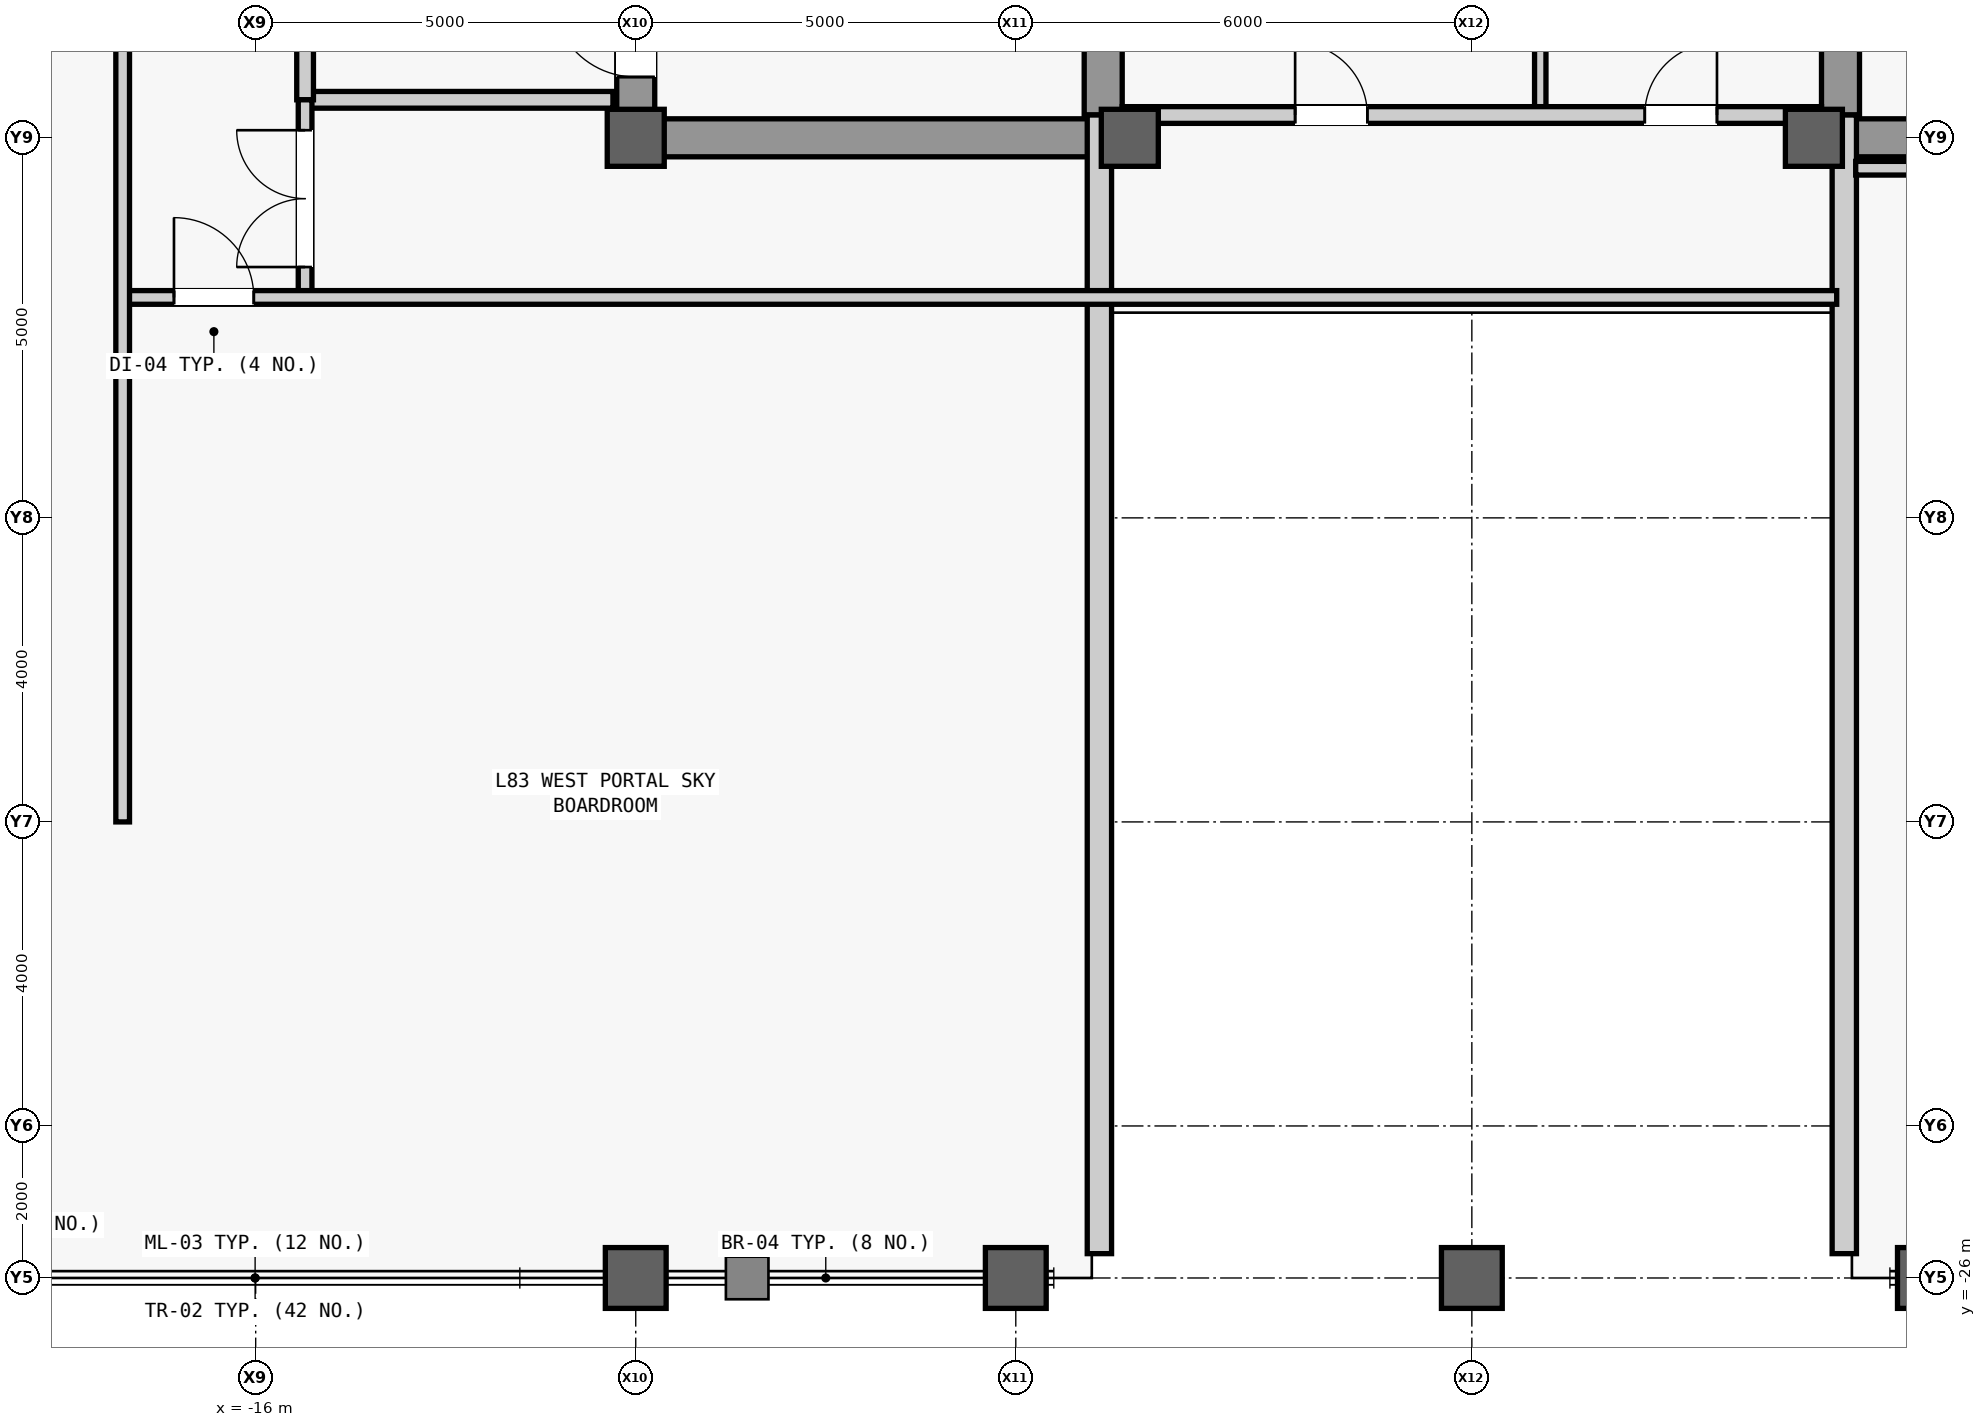
"""IFC4 building model, lengths in metres.
Left out: names, types, materials, properties, quantities, classifications, styles, units other than length and angle.
Written with IfcOpenShell. Run it as: python <this file> out.ifc"""

import sys

from ifc_helpers import new_model, si_unit, direction, frame, frame_2d, origin, origin_2d, place, context, subcontext, project, spatial, rectangle, hollow_rectangle, extrude, source, transform, mapped, element, fill, save


model = new_model("IFC4")
c1 = context("Model", 3, precision=1e-05, world=origin(), true_north=direction((0.0, 1.0)))
c2 = subcontext(c1, "Body", "Model", "MODEL_VIEW")
j1 = project(units=[si_unit("LENGTHUNIT", "METRE"), si_unit("PLANEANGLEUNIT", "RADIAN")], contexts=[c1])
p1 = place(None, origin())
s1 = spatial("IfcSite", under=j1, at=p1, CompositionType="ELEMENT")
p2 = place(p1, origin())
s2 = spatial("IfcBuilding", under=s1, at=p2, CompositionType="ELEMENT")
p3 = place(p2, frame((0.0, 0.0, 350.3)))
s3 = spatial("IfcBuildingStorey", under=s2, at=p3, CompositionType="ELEMENT", Elevation=350.3)
m1 = source(origin(), c2, "Body", "SweptSolid", [
    extrude(rectangle(XDim=22.0, YDim=0.5, at=frame_2d((11.0, 0.0))), origin(), (0.0, 0.0, 1.0), 3.74),
])
p4 = place(p3, frame((-11.0, -11.0, 0.0), z_axis=(0.0, 0.0, 1.0), x_axis=(0.0, 1.0, 0.0)))
e1 = element("IfcWall", 1, at=p4, inside=s3, PredefinedType="SHEAR", context=c2, shape_type="MappedRepresentation", body=[
    mapped(m1, transform((0.0, 0.0, 0.0), scale=1.0)),
])
m2 = source(origin(), c2, "Body", "SweptSolid", [
    extrude(rectangle(XDim=1.1, YDim=2.2, at=frame_2d((0.55, 1.1))), frame((0.0, 0.26, 0.0), z_axis=(0.0, -1.0, 0.0), x_axis=(1.0, 0.0, 0.0)), (0.0, 0.0, 1.0), 0.52),
])
p5 = place(p4, frame((0.8, 0.0, 0.0)))
e2 = element("IfcOpeningElement", 2, at=p5, cuts=e1, PredefinedType="OPENING", context=c2, shape_type="MappedRepresentation", body=[
    mapped(m2, transform((0.0, 0.0, 0.0), scale=1.0)),
])
p6 = place(p4, frame((12.5, 0.0, 0.0)))
e3 = element("IfcOpeningElement", 3, at=p6, cuts=e1, PredefinedType="OPENING", context=c2, shape_type="MappedRepresentation", body=[
    mapped(m2, transform((0.0, 0.0, 0.0), scale=1.0)),
])
m3 = source(origin(), c2, "Body", "SweptSolid", [
    extrude(rectangle(XDim=0.9, YDim=2.15, at=frame_2d((0.45, 1.075))), frame((0.0, 0.26, 0.0), z_axis=(0.0, -1.0, 0.0), x_axis=(1.0, 0.0, 0.0)), (0.0, 0.0, 1.0), 0.52),
])
p7 = place(p4, frame((6.2, 0.0, 0.0)))
e4 = element("IfcOpeningElement", 4, at=p7, cuts=e1, PredefinedType="OPENING", context=c2, shape_type="MappedRepresentation", body=[
    mapped(m3, transform((0.0, 0.0, 0.0), scale=1.0)),
])
p8 = place(p4, frame((8.05, 0.0, 0.0)))
e5 = element("IfcOpeningElement", 5, at=p8, cuts=e1, PredefinedType="OPENING", context=c2, shape_type="MappedRepresentation", body=[
    mapped(m3, transform((0.0, 0.0, 0.0), scale=1.0)),
])
m4 = source(origin(), c2, "Body", "SweptSolid", [
    extrude(rectangle(XDim=1.2, YDim=2.3, at=frame_2d((0.6, 1.15))), frame((0.0, 0.26, 0.0), z_axis=(0.0, -1.0, 0.0), x_axis=(1.0, 0.0, 0.0)), (0.0, 0.0, 1.0), 0.52),
])
p9 = place(p4, frame((14.6, 0.0, 0.0)))
e6 = element("IfcOpeningElement", 6, at=p9, cuts=e1, PredefinedType="OPENING", context=c2, shape_type="MappedRepresentation", body=[
    mapped(m4, transform((0.0, 0.0, 0.0), scale=1.0)),
])
p10 = place(p4, frame((18.2, 0.0, 0.0)))
e7 = element("IfcOpeningElement", 7, at=p10, cuts=e1, PredefinedType="OPENING", context=c2, shape_type="MappedRepresentation", body=[
    mapped(m4, transform((0.0, 0.0, 0.0), scale=1.0)),
])
m5 = source(origin(), c2, "Body", "SweptSolid", [
    extrude(rectangle(XDim=1.3, YDim=2.3, at=frame_2d((0.65, 1.15))), frame((0.0, 0.26, 0.0), z_axis=(0.0, -1.0, 0.0), x_axis=(1.0, 0.0, 0.0)), (0.0, 0.0, 1.0), 0.52),
])
p11 = place(p4, frame((2.7, 0.0, 0.0)))
e8 = element("IfcOpeningElement", 8, at=p11, cuts=e1, PredefinedType="OPENING", context=c2, shape_type="MappedRepresentation", body=[
    mapped(m5, transform((0.0, 0.0, 0.0), scale=1.0)),
])
m6 = source(origin(), c2, "Body", "SweptSolid", [
    extrude(rectangle(XDim=21.4, YDim=0.5, at=frame_2d((10.7, 0.0))), origin(), (0.0, 0.0, 1.0), 3.74),
])
for number, where, z_axis, x_axis in (
    (9, (-4.85, -10.7, 0.0), (0.0, 0.0, 1.0), (0.0, 1.0, 0.0)),
    (10, (4.85, -10.7, 0.0), (0.0, 0.0, 1.0), (0.0, 1.0, 0.0)),
):
    element("IfcWall", number, at=place(p3, frame(where, z_axis=z_axis, x_axis=x_axis)), inside=s3, PredefinedType="SHEAR", context=c2, shape_type="MappedRepresentation", body=[
        mapped(m6, transform((0.0, 0.0, 0.0), scale=1.0)),
    ])
m7 = source(origin(), c2, "Body", "SweptSolid", [
    extrude(rectangle(XDim=5.9, YDim=0.5, at=frame_2d((2.95, 0.0))), origin(), (0.0, 0.0, 1.0), 3.74),
])
for number, where, z_axis, x_axis in (
    (11, (-10.75, -11.0, 0.0), (0.0, 0.0, 1.0), (1.0, 0.0, 0.0)),
    (12, (4.85, -11.0, 0.0), (0.0, 0.0, 1.0), (1.0, 0.0, 0.0)),
):
    element("IfcWall", number, at=place(p3, frame(where, z_axis=z_axis, x_axis=x_axis)), inside=s3, PredefinedType="SHEAR", context=c2, shape_type="MappedRepresentation", body=[
        mapped(m7, transform((0.0, 0.0, 0.0), scale=1.0)),
    ])
m8 = source(origin(), c2, "Body", "SweptSolid", [
    extrude(hollow_rectangle(XDim=0.8, YDim=0.8, WallThickness=0.045, at=origin_2d()), origin(), (0.0, 0.0, 1.0), 4.0),
])
p12 = place(p3, frame((-11.0, -26.0, 0.0), z_axis=(0.0, 0.0, 1.0), x_axis=(1.0, 0.0, 0.0)))
e13 = element("IfcColumn", 13, at=p12, inside=s3, PredefinedType="COLUMN", context=c2, shape_type="MappedRepresentation", body=[
    mapped(m8, transform((0.0, 0.0, 0.0), scale=1.0)),
])
m9 = source(origin(), c2, "Body", "SweptSolid", [
    extrude(rectangle(XDim=0.75, YDim=0.75, at=origin_2d()), origin(), (0.0, 0.0, 1.0), 4.0),
])
p13 = place(p3, frame((-11.0, -11.0, 0.0), z_axis=(0.0, 0.0, 1.0), x_axis=(1.0, 0.0, 0.0)))
e14 = element("IfcColumn", 14, at=p13, inside=s3, PredefinedType="COLUMN", context=c2, shape_type="MappedRepresentation", body=[
    mapped(m9, transform((0.0, 0.0, 0.0), scale=1.0)),
])
p14 = place(p3, frame((-6.0, -26.0, 0.0), z_axis=(0.0, 0.0, 1.0), x_axis=(1.0, 0.0, 0.0)))
e15 = element("IfcColumn", 15, at=p14, inside=s3, PredefinedType="COLUMN", context=c2, shape_type="MappedRepresentation", body=[
    mapped(m8, transform((0.0, 0.0, 0.0), scale=1.0)),
])
p15 = place(p3, frame((-4.5, -11.0, 0.0), z_axis=(0.0, 0.0, 1.0), x_axis=(1.0, 0.0, 0.0)))
e16 = element("IfcColumn", 16, at=p15, inside=s3, PredefinedType="COLUMN", context=c2, shape_type="MappedRepresentation", body=[
    mapped(m9, transform((0.0, 0.0, 0.0), scale=1.0)),
])
p16 = place(p3, frame((0.0, -26.0, 0.0), z_axis=(0.0, 0.0, 1.0), x_axis=(1.0, 0.0, 0.0)))
e17 = element("IfcColumn", 17, at=p16, inside=s3, PredefinedType="COLUMN", context=c2, shape_type="MappedRepresentation", body=[
    mapped(m8, transform((0.0, 0.0, 0.0), scale=1.0)),
])
p17 = place(p3, frame((4.5, -11.0, 0.0), z_axis=(0.0, 0.0, 1.0), x_axis=(1.0, 0.0, 0.0)))
e18 = element("IfcColumn", 18, at=p17, inside=s3, PredefinedType="COLUMN", context=c2, shape_type="MappedRepresentation", body=[
    mapped(m9, transform((0.0, 0.0, 0.0), scale=1.0)),
])
p18 = place(p3, frame((6.0, -26.0, 0.0), z_axis=(0.0, 0.0, 1.0), x_axis=(1.0, 0.0, 0.0)))
e19 = element("IfcColumn", 19, at=p18, inside=s3, PredefinedType="COLUMN", context=c2, shape_type="MappedRepresentation", body=[
    mapped(m8, transform((0.0, 0.0, 0.0), scale=1.0)),
])
m10 = source(origin(), c2, "Body", "SweptSolid", [
    extrude(rectangle(XDim=14.98, YDim=0.32, at=frame_2d((7.49, 0.0))), origin(), (0.0, 0.0, 1.0), 3.045),
])
for number, where, z_axis, x_axis in (
    (20, (-4.9, -25.68, 0.0), (0.0, 0.0, 1.0), (0.0, 1.0, 0.0)),
    (21, (4.9, -25.68, 0.0), (0.0, 0.0, 1.0), (0.0, 1.0, 0.0)),
):
    element("IfcWall", number, at=place(p3, frame(where, z_axis=z_axis, x_axis=x_axis)), inside=s3, PredefinedType="STANDARD", context=c2, shape_type="MappedRepresentation", body=[
        mapped(m10, transform((0.0, 0.0, 0.0), scale=1.0)),
    ])
m11 = source(origin(), c2, "Body", "SweptSolid", [
    extrude(rectangle(XDim=4.05, YDim=0.22, at=frame_2d((2.025, 0.0))), origin(), (0.0, 0.0, 1.0), 3.74),
])
p19 = place(p3, frame((-15.35, -10.5, 0.0), z_axis=(0.0, 0.0, 1.0), x_axis=(1.0, 0.0, 0.0)))
e22 = element("IfcWall", 22, at=p19, inside=s3, PredefinedType="PARTITIONING", context=c2, shape_type="MappedRepresentation", body=[
    mapped(m11, transform((0.0, 0.0, 0.0), scale=1.0)),
])
m12 = source(origin(), c2, "Body", "SweptSolid", [
    extrude(rectangle(XDim=4.4, YDim=0.22, at=frame_2d((2.2, 0.0))), origin(), (0.0, 0.0, 1.0), 3.74),
])
p20 = place(p3, frame((-15.35, -10.5, 0.0), z_axis=(0.0, 0.0, 1.0), x_axis=(0.0, 1.0, 0.0)))
e23 = element("IfcWall", 23, at=p20, inside=s3, PredefinedType="PARTITIONING", context=c2, shape_type="MappedRepresentation", body=[
    mapped(m12, transform((0.0, 0.0, 0.0), scale=1.0)),
])
m13 = source(origin(), c2, "Body", "SweptSolid", [
    extrude(rectangle(XDim=1.2, YDim=2.2, at=frame_2d((0.6, 1.1))), frame((0.0, 0.12, 0.0), z_axis=(0.0, -1.0, 0.0), x_axis=(1.0, 0.0, 0.0)), (0.0, 0.0, 1.0), 0.24),
])
p21 = place(p20, frame((1.6, 0.0, 0.0)))
e24 = element("IfcOpeningElement", 24, at=p21, cuts=e23, PredefinedType="OPENING", context=c2, shape_type="MappedRepresentation", body=[
    mapped(m13, transform((0.0, 0.0, 0.0), scale=1.0)),
])
m14 = source(origin(), c2, "Body", "SweptSolid", [
    extrude(rectangle(XDim=5.4, YDim=0.15, at=frame_2d((2.7, 0.0))), origin(), (0.0, 0.0, 1.0), 3.74),
])
p22 = place(p3, frame((0.9, -10.7, 0.0), z_axis=(0.0, 0.0, 1.0), x_axis=(0.0, 1.0, 0.0)))
e25 = element("IfcWall", 25, at=p22, inside=s3, PredefinedType="PARTITIONING", context=c2, shape_type="MappedRepresentation", body=[
    mapped(m14, transform((0.0, 0.0, 0.0), scale=1.0)),
])
m15 = source(origin(), c2, "Body", "SweptSolid", [
    extrude(rectangle(XDim=9.2, YDim=0.22, at=frame_2d((4.6, 0.0))), origin(), (0.0, 0.0, 1.0), 3.74),
])
p23 = place(p3, frame((-4.6, -10.7, 0.0), z_axis=(0.0, 0.0, 1.0), x_axis=(1.0, 0.0, 0.0)))
e26 = element("IfcWall", 26, at=p23, inside=s3, PredefinedType="PARTITIONING", context=c2, shape_type="MappedRepresentation", body=[
    mapped(m15, transform((0.0, 0.0, 0.0), scale=1.0)),
])
m16 = source(origin(), c2, "Body", "SweptSolid", [
    extrude(rectangle(XDim=0.95, YDim=2.15, at=frame_2d((0.475, 1.075))), frame((0.0, 0.12, 0.0), z_axis=(0.0, -1.0, 0.0), x_axis=(1.0, 0.0, 0.0)), (0.0, 0.0, 1.0), 0.24),
])
p24 = place(p23, frame((2.275, 0.0, 0.0)))
e27 = element("IfcOpeningElement", 27, at=p24, cuts=e26, PredefinedType="OPENING", context=c2, shape_type="MappedRepresentation", body=[
    mapped(m16, transform((0.0, 0.0, 0.0), scale=1.0)),
])
p25 = place(p23, frame((6.875, 0.0, 0.0)))
e28 = element("IfcOpeningElement", 28, at=p25, cuts=e26, PredefinedType="OPENING", context=c2, shape_type="MappedRepresentation", body=[
    mapped(m16, transform((0.0, 0.0, 0.0), scale=1.0)),
])
m17 = source(origin(), c2, "Body", "SweptSolid", [
    extrude(rectangle(XDim=2.6, YDim=0.18, at=frame_2d((1.3, 0.0))), origin(), (0.0, 0.0, 1.0), 3.74),
])
p26 = place(p3, frame((-15.35, -13.1, 0.0), z_axis=(0.0, 0.0, 1.0), x_axis=(0.0, 1.0, 0.0)))
e29 = element("IfcWall", 29, at=p26, inside=s3, PredefinedType="PARTITIONING", context=c2, shape_type="MappedRepresentation", body=[
    mapped(m17, transform((0.0, 0.0, 0.0), scale=1.0)),
])
m18 = source(origin(), c2, "Body", "SweptSolid", [
    extrude(rectangle(XDim=1.8, YDim=2.25, at=frame_2d((0.9, 1.125))), frame((0.0, 0.1, 0.0), z_axis=(0.0, -1.0, 0.0), x_axis=(1.0, 0.0, 0.0)), (0.0, 0.0, 1.0), 0.2),
])
p27 = place(p26, frame((0.4, 0.0, 0.0)))
e30 = element("IfcOpeningElement", 30, at=p27, cuts=e29, PredefinedType="OPENING", context=c2, shape_type="MappedRepresentation", body=[
    mapped(m18, transform((0.0, 0.0, 0.0), scale=1.0)),
])
m19 = source(origin(), c2, "Body", "SweptSolid", [
    extrude(rectangle(XDim=22.55, YDim=0.18, at=frame_2d((11.275, 0.0))), origin(), (0.0, 0.0, 1.0), 3.74),
])
p28 = place(p3, frame((-17.75, -13.1, 0.0), z_axis=(0.0, 0.0, 1.0), x_axis=(1.0, 0.0, 0.0)))
e31 = element("IfcWall", 31, at=p28, inside=s3, PredefinedType="PARTITIONING", context=c2, shape_type="MappedRepresentation", body=[
    mapped(m19, transform((0.0, 0.0, 0.0), scale=1.0)),
])
m20 = source(origin(), c2, "Body", "SweptSolid", [
    extrude(rectangle(XDim=1.05, YDim=2.2, at=frame_2d((0.525, 1.1))), frame((0.0, 0.1, 0.0), z_axis=(0.0, -1.0, 0.0), x_axis=(1.0, 0.0, 0.0)), (0.0, 0.0, 1.0), 0.2),
])
p29 = place(p28, frame((0.675, 0.0, 0.0)))
e32 = element("IfcOpeningElement", 32, at=p29, cuts=e31, PredefinedType="OPENING", context=c2, shape_type="MappedRepresentation", body=[
    mapped(m20, transform((0.0, 0.0, 0.0), scale=1.0)),
])
m21 = source(origin(), c2, "Body", "SweptSolid", [
    extrude(rectangle(XDim=12.7, YDim=0.18, at=frame_2d((6.35, 0.0))), origin(), (0.0, 0.0, 1.0), 2.79),
])
p30 = place(p3, frame((5.05, -11.4, 0.0), z_axis=(0.0, 0.0, 1.0), x_axis=(1.0, 0.0, 0.0)))
e33 = element("IfcWall", 33, at=p30, inside=s3, PredefinedType="PARTITIONING", context=c2, shape_type="MappedRepresentation", body=[
    mapped(m21, transform((0.0, 0.0, 0.0), scale=1.0)),
])
p31 = place(p30, frame((10.975, 0.0, 0.0)))
e34 = element("IfcOpeningElement", 34, at=p31, cuts=e33, PredefinedType="OPENING", context=c2, shape_type="MappedRepresentation", body=[
    mapped(m20, transform((0.0, 0.0, 0.0), scale=1.0)),
])
m22 = source(origin(), c2, "Body", "SweptSolid", [
    extrude(rectangle(XDim=40.0, YDim=0.18, at=frame_2d((20.0, 0.0))), origin(), (0.0, 0.0, 1.0), 3.74),
])
p32 = place(p3, frame((-17.75, -20.0, 0.0), z_axis=(0.0, 0.0, 1.0), x_axis=(0.0, 1.0, 0.0)))
e35 = element("IfcWall", 35, at=p32, inside=s3, PredefinedType="PARTITIONING", context=c2, shape_type="MappedRepresentation", body=[
    mapped(m22, transform((0.0, 0.0, 0.0), scale=1.0)),
])
m23 = source(origin(), c2, "Body", "SweptSolid", [
    extrude(rectangle(XDim=0.95, YDim=2.15, at=frame_2d((0.475, 1.075))), frame((0.0, 0.1, 0.0), z_axis=(0.0, -1.0, 0.0), x_axis=(1.0, 0.0, 0.0)), (0.0, 0.0, 1.0), 0.2),
])
p33 = place(p32, frame((11.389, 0.0, 0.0)))
e36 = element("IfcOpeningElement", 36, at=p33, cuts=e35, PredefinedType="OPENING", context=c2, shape_type="MappedRepresentation", body=[
    mapped(m23, transform((0.0, 0.0, 0.0), scale=1.0)),
])
p34 = place(p32, frame((17.473, 0.0, 0.0)))
e37 = element("IfcOpeningElement", 37, at=p34, cuts=e35, PredefinedType="OPENING", context=c2, shape_type="MappedRepresentation", body=[
    mapped(m23, transform((0.0, 0.0, 0.0), scale=1.0)),
])
p35 = place(p32, frame((23.857, 0.0, 0.0)))
e38 = element("IfcOpeningElement", 38, at=p35, cuts=e35, PredefinedType="OPENING", context=c2, shape_type="MappedRepresentation", body=[
    mapped(m23, transform((0.0, 0.0, 0.0), scale=1.0)),
])
p36 = place(p32, frame((28.573, 0.0, 0.0)))
e39 = element("IfcOpeningElement", 39, at=p36, cuts=e35, PredefinedType="OPENING", context=c2, shape_type="MappedRepresentation", body=[
    mapped(m23, transform((0.0, 0.0, 0.0), scale=1.0)),
])
m24 = source(origin(), c2, "Body", "SweptSolid", [
    extrude(rectangle(XDim=1.1, YDim=2.2, at=frame_2d((0.55, 1.1))), frame((0.0, 0.025, 0.0), z_axis=(0.0, -1.0, 0.0), x_axis=(1.0, 0.0, 0.0)), (0.0, 0.0, 1.0), 0.05),
])
p37 = place(p5, origin())
e40 = element("IfcDoor", 40, at=p37, inside=s3, OperationType="SINGLE_SWING_RIGHT", PredefinedType="DOOR", context=c2, shape_type="MappedRepresentation", body=[
    mapped(m24, transform((0.0, 0.0, 0.0), scale=1.0)),
])
fill(e2, e40)
m25 = source(origin(), c2, "Body", "SweptSolid", [
    extrude(rectangle(XDim=0.95, YDim=2.15, at=frame_2d((0.475, 1.075))), frame((0.0, 0.025, 0.0), z_axis=(0.0, -1.0, 0.0), x_axis=(1.0, 0.0, 0.0)), (0.0, 0.0, 1.0), 0.05),
])
p38 = place(p24, origin())
e41 = element("IfcDoor", 41, at=p38, inside=s3, OperationType="SINGLE_SWING_LEFT", PredefinedType="DOOR", context=c2, shape_type="MappedRepresentation", body=[
    mapped(m25, transform((0.0, 0.0, 0.0), scale=1.0)),
])
fill(e27, e41)
p39 = place(p25, origin())
e42 = element("IfcDoor", 42, at=p39, inside=s3, OperationType="SINGLE_SWING_RIGHT", PredefinedType="DOOR", context=c2, shape_type="MappedRepresentation", body=[
    mapped(m25, transform((0.0, 0.0, 0.0), scale=1.0)),
])
fill(e28, e42)
m26 = source(origin(), c2, "Body", "SweptSolid", [
    extrude(rectangle(XDim=1.8, YDim=2.25, at=frame_2d((0.9, 1.125))), frame((0.0, 0.025, 0.0), z_axis=(0.0, -1.0, 0.0), x_axis=(1.0, 0.0, 0.0)), (0.0, 0.0, 1.0), 0.05),
])
p40 = place(p27, origin())
e43 = element("IfcDoor", 43, at=p40, inside=s3, OperationType="DOUBLE_DOOR_SINGLE_SWING", PredefinedType="DOOR", context=c2, shape_type="MappedRepresentation", body=[
    mapped(m26, transform((0.0, 0.0, 0.0), scale=1.0)),
])
fill(e30, e43)
m27 = source(origin(), c2, "Body", "SweptSolid", [
    extrude(rectangle(XDim=1.05, YDim=2.2, at=frame_2d((0.525, 1.1))), frame((0.0, 0.025, 0.0), z_axis=(0.0, -1.0, 0.0), x_axis=(1.0, 0.0, 0.0)), (0.0, 0.0, 1.0), 0.05),
])
p41 = place(p29, origin())
e44 = element("IfcDoor", 44, at=p41, inside=s3, OperationType="SINGLE_SWING_LEFT", PredefinedType="DOOR", context=c2, shape_type="MappedRepresentation", body=[
    mapped(m27, transform((0.0, 0.0, 0.0), scale=1.0)),
])
fill(e32, e44)
save(model, sys.argv[1])
